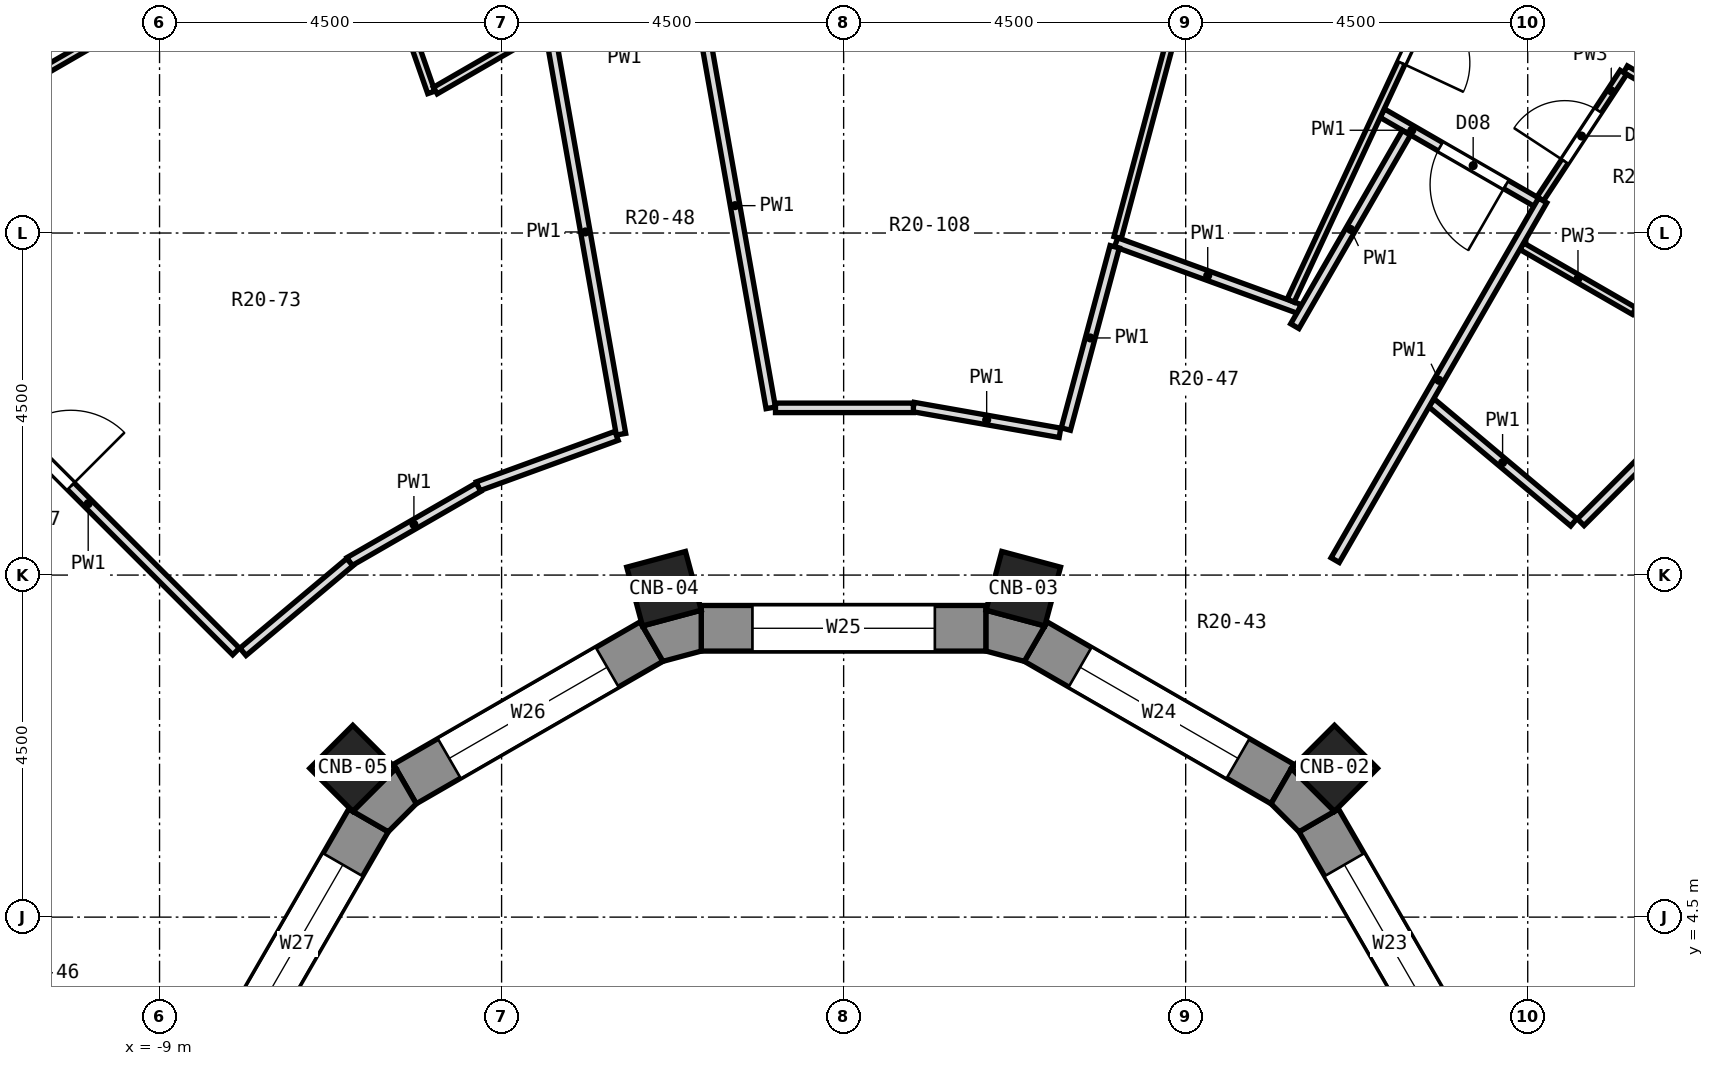
"""IFC4 building model, lengths in metres.
Left out: names, types, materials, properties, quantities, classifications, styles, units other than length and angle.
Written with IfcOpenShell. Run it as: python <this file> out.ifc"""

import sys

from ifc_helpers import new_model, si_unit, direction, frame, frame_2d, origin, origin_2d, place, context, subcontext, project, spatial, polyline, rectangle, outline, extrude, element, fill, save


model = new_model("IFC4")
c1 = context("Model", 3, precision=1e-05, world=origin(), true_north=direction((0.0, 1.0)))
c2 = subcontext(c1, "Body", "Model", "MODEL_VIEW")
j1 = project(units=[si_unit("LENGTHUNIT", "METRE"), si_unit("PLANEANGLEUNIT", "RADIAN")], contexts=[c1])
p1 = place(None, origin())
s1 = spatial("IfcSite", under=j1, at=p1, CompositionType="ELEMENT")
p2 = place(p1, origin())
s2 = spatial("IfcBuilding", under=s1, at=p2, CompositionType="ELEMENT")
p3 = place(p2, frame((0.0, 0.0, 121.6)))
s3 = spatial("IfcBuildingStorey", under=s2, at=p3, CompositionType="ELEMENT", Elevation=121.6)
for number, where, z_axis, x_axis in (
    (1, (6.458, 6.458, 0.0), (0.0, 0.0, 1.0), (0.707, 0.707, 0.0)),
    (2, (2.364, 8.821, 0.0), (0.0, 0.0, 1.0), (0.259, 0.966, 0.0)),
    (3, (-2.364, 8.821, 0.0), (0.0, 0.0, 1.0), (-0.259, 0.966, 0.0)),
    (4, (-6.458, 6.458, 0.0), (0.0, 0.0, 1.0), (-0.707, 0.707, 0.0)),
):
    element("IfcColumn", number, at=place(p3, frame(where, z_axis=z_axis, x_axis=x_axis)), inside=s3, PredefinedType="COLUMN", context=c2, shape_type="SweptSolid", body=[
        extrude(rectangle(XDim=0.8, YDim=0.8, at=origin_2d()), origin(), (0.0, 0.0, 1.0), 3.3),
    ])
p4 = place(p3, frame((8.125, 2.527, 0.0), z_axis=(0.0, 0.0, 1.0), x_axis=(-0.499964958637, 0.86604563398, 0.0)))
e5 = element("IfcWall", 5, at=p4, inside=s3, PredefinedType="SOLIDWALL", context=c2, shape_type="SweptSolid", body=[
    extrude(rectangle(XDim=3.747, YDim=0.6, at=frame_2d((1.874, 0.0))), origin(), (0.0, 0.0, 1.0), 2.8),
])
p5 = place(p4, frame((0.674, 0.0, 0.9)))
e6 = element("IfcOpeningElement", 6, at=p5, cuts=e5, PredefinedType="OPENING", context=c2, shape_type="SweptSolid", body=[
    extrude(rectangle(XDim=2.4, YDim=1.8, at=frame_2d((1.2, 0.9))), frame((0.0, 0.312, 0.0), z_axis=(0.0, -1.0, 0.0), x_axis=(1.0, 0.0, 0.0)), (0.0, 0.0, 1.0), 0.624),
])
p6 = place(p3, frame((5.773, 6.251, 0.0), z_axis=(0.0, 0.0, 1.0), x_axis=(-0.86604563398, 0.499964958637, 0.0)))
e7 = element("IfcWall", 7, at=p6, inside=s3, PredefinedType="SOLIDWALL", context=c2, shape_type="SweptSolid", body=[
    extrude(rectangle(XDim=3.747, YDim=0.6, at=frame_2d((1.874, 0.0))), origin(), (0.0, 0.0, 1.0), 2.8),
])
p7 = place(p6, frame((0.674, 0.0, 0.9)))
e8 = element("IfcOpeningElement", 8, at=p7, cuts=e7, PredefinedType="OPENING", context=c2, shape_type="SweptSolid", body=[
    extrude(rectangle(XDim=2.4, YDim=1.8, at=frame_2d((1.2, 0.9))), frame((0.0, 0.312, 0.0), z_axis=(0.0, -1.0, 0.0), x_axis=(1.0, 0.0, 0.0)), (0.0, 0.0, 1.0), 0.624),
])
p8 = place(p3, frame((1.874, 8.3, 0.0), z_axis=(0.0, 0.0, 1.0), x_axis=(-1.0, 0.0, 0.0)))
e9 = element("IfcWall", 9, at=p8, inside=s3, PredefinedType="SOLIDWALL", context=c2, shape_type="SweptSolid", body=[
    extrude(rectangle(XDim=3.748, YDim=0.6, at=frame_2d((1.874, 0.0))), origin(), (0.0, 0.0, 1.0), 2.8),
])
p9 = place(p8, frame((0.674, 0.0, 0.9)))
e10 = element("IfcOpeningElement", 10, at=p9, cuts=e9, PredefinedType="OPENING", context=c2, shape_type="SweptSolid", body=[
    extrude(rectangle(XDim=2.4, YDim=1.8, at=frame_2d((1.2, 0.9))), frame((0.0, 0.312, 0.0), z_axis=(0.0, -1.0, 0.0), x_axis=(1.0, 0.0, 0.0)), (0.0, 0.0, 1.0), 0.624),
])
p10 = place(p3, frame((-2.527, 8.125, 0.0), z_axis=(0.0, 0.0, 1.0), x_axis=(-0.86604563398, -0.499964958637, 0.0)))
e11 = element("IfcWall", 11, at=p10, inside=s3, PredefinedType="SOLIDWALL", context=c2, shape_type="SweptSolid", body=[
    extrude(rectangle(XDim=3.747, YDim=0.6, at=frame_2d((1.874, 0.0))), origin(), (0.0, 0.0, 1.0), 2.8),
])
p11 = place(p10, frame((0.674, 0.0, 0.9)))
e12 = element("IfcOpeningElement", 12, at=p11, cuts=e11, PredefinedType="OPENING", context=c2, shape_type="SweptSolid", body=[
    extrude(rectangle(XDim=2.4, YDim=1.8, at=frame_2d((1.2, 0.9))), frame((0.0, 0.312, 0.0), z_axis=(0.0, -1.0, 0.0), x_axis=(1.0, 0.0, 0.0)), (0.0, 0.0, 1.0), 0.624),
])
p12 = place(p3, frame((-6.251, 5.773, 0.0), z_axis=(0.0, 0.0, 1.0), x_axis=(-0.499964958637, -0.86604563398, 0.0)))
e13 = element("IfcWall", 13, at=p12, inside=s3, PredefinedType="SOLIDWALL", context=c2, shape_type="SweptSolid", body=[
    extrude(rectangle(XDim=3.747, YDim=0.6, at=frame_2d((1.874, 0.0))), origin(), (0.0, 0.0, 1.0), 2.8),
])
p13 = place(p12, frame((0.674, 0.0, 0.9)))
e14 = element("IfcOpeningElement", 14, at=p13, cuts=e13, PredefinedType="OPENING", context=c2, shape_type="SweptSolid", body=[
    extrude(rectangle(XDim=2.4, YDim=1.8, at=frame_2d((1.2, 0.9))), frame((0.0, 0.312, 0.0), z_axis=(0.0, -1.0, 0.0), x_axis=(1.0, 0.0, 0.0)), (0.0, 0.0, 1.0), 0.624),
])
p14 = place(p3, origin())
e15 = element("IfcWall", 15, at=p14, inside=s3, PredefinedType="SOLIDWALL", context=c2, shape_type="SweptSolid", body=[
    extrude(outline(polyline([(5.892, 6.458), (5.623, 5.991), (5.991, 5.623), (6.458, 5.892), (5.892, 6.458)])), origin(), (0.0, 0.0, 1.0), 2.8),
])
p15 = place(p3, origin())
e16 = element("IfcWall", 16, at=p15, inside=s3, PredefinedType="SOLIDWALL", context=c2, shape_type="SweptSolid", body=[
    extrude(outline(polyline([(1.874, 8.538), (1.874, 8.0), (2.377, 7.865), (2.646, 8.331), (1.874, 8.538)])), origin(), (0.0, 0.0, 1.0), 2.8),
])
p16 = place(p3, origin())
e17 = element("IfcWall", 17, at=p16, inside=s3, PredefinedType="SOLIDWALL", context=c2, shape_type="SweptSolid", body=[
    extrude(outline(polyline([(-2.646, 8.331), (-2.377, 7.865), (-1.874, 8.0), (-1.874, 8.538), (-2.646, 8.331)])), origin(), (0.0, 0.0, 1.0), 2.8),
])
p17 = place(p3, origin())
e18 = element("IfcWall", 18, at=p17, inside=s3, PredefinedType="SOLIDWALL", context=c2, shape_type="SweptSolid", body=[
    extrude(outline(polyline([(-6.458, 5.892), (-5.991, 5.623), (-5.623, 5.991), (-5.892, 6.458), (-6.458, 5.892)])), origin(), (0.0, 0.0, 1.0), 2.8),
])
p18 = place(p3, frame((-3.867, 16.174, 0.0), z_axis=(0.0, 0.0, 1.0), x_axis=(0.173602314867, -0.98481583876, 0.0)))
e19 = element("IfcWall", 19, at=p18, inside=s3, PredefinedType="PARTITIONING", context=c2, shape_type="SweptSolid", body=[
    extrude(rectangle(XDim=5.403, YDim=0.125, at=frame_2d((2.702, 0.0))), origin(), (0.0, 0.0, 1.0), 2.8),
])
p19 = place(p3, frame((-1.898, 16.521, 0.0), z_axis=(0.0, 0.0, 1.0), x_axis=(0.173777601074, -0.984784923405, 0.0)))
e20 = element("IfcWall", 20, at=p19, inside=s3, PredefinedType="PARTITIONING", context=c2, shape_type="SweptSolid", body=[
    extrude(rectangle(XDim=5.403, YDim=0.125, at=frame_2d((2.702, 0.0))), origin(), (0.0, 0.0, 1.0), 2.8),
])
p20 = place(p3, frame((-6.292, 17.835, 0.0), z_axis=(0.0, 0.0, 1.0), x_axis=(0.329581778564, -0.944127031304, 0.0)))
e21 = element("IfcWall", 21, at=p20, inside=s3, PredefinedType="PARTITIONING", context=c2, shape_type="SweptSolid", body=[
    extrude(rectangle(XDim=2.632, YDim=0.1, at=frame_2d((1.316, 0.0))), origin(), (0.0, 0.0, 1.0), 2.8),
])
p21 = place(p20, frame((0.916, 0.0, 0.0)))
e22 = element("IfcOpeningElement", 22, at=p21, cuts=e21, PredefinedType="OPENING", context=c2, shape_type="SweptSolid", body=[
    extrude(rectangle(XDim=0.8, YDim=2.1, at=frame_2d((0.4, 1.05))), frame((0.0, 0.062, 0.0), z_axis=(0.0, -1.0, 0.0), x_axis=(1.0, 0.0, 0.0)), (0.0, 0.0, 1.0), 0.124),
])
p22 = place(p3, frame((-13.086, 13.086, 0.0), z_axis=(0.0, 0.0, 1.0), x_axis=(0.707208486583, -0.707005061159, 0.0)))
e23 = element("IfcWall", 23, at=p22, inside=s3, PredefinedType="PARTITIONING", context=c2, shape_type="SweptSolid", body=[
    extrude(rectangle(XDim=7.201, YDim=0.125, at=frame_2d((3.601, 0.0))), origin(), (0.0, 0.0, 1.0), 2.8),
])
p23 = place(p22, frame((3.126, 0.0, 0.0)))
e24 = element("IfcOpeningElement", 24, at=p23, cuts=e23, PredefinedType="OPENING", context=c2, shape_type="SweptSolid", body=[
    extrude(rectangle(XDim=1.0, YDim=2.1, at=frame_2d((0.5, 1.05))), frame((0.0, 0.074, 0.0), z_axis=(0.0, -1.0, 0.0), x_axis=(1.0, 0.0, 0.0)), (0.0, 0.0, 1.0), 0.149),
])
p24 = place(p3, frame((7.733, 11.267, 0.0), z_axis=(0.0, 0.0, 1.0), x_axis=(0.765785489597, -0.643096092293, 0.0)))
e25 = element("IfcWall", 25, at=p24, inside=s3, PredefinedType="PARTITIONING", context=c2, shape_type="SweptSolid", body=[
    extrude(rectangle(XDim=2.446, YDim=0.125, at=frame_2d((1.223, 0.0))), origin(), (0.0, 0.0, 1.0), 2.8),
])
p25 = place(p3, frame((8.921, 13.327, 0.0), z_axis=(0.0, 0.0, 1.0), x_axis=(0.866168931404, -0.499751320429, 0.0)))
e26 = element("IfcWall", 26, at=p25, inside=s3, PredefinedType="PARTITIONING", context=c2, shape_type="SweptSolid", body=[
    extrude(rectangle(XDim=1.708, YDim=0.1, at=frame_2d((0.854, 0.0))), origin(), (0.0, 0.0, 1.0), 2.8),
])
p26 = place(p3, frame((7.086, 15.077, 0.0), z_axis=(0.0, 0.0, 1.0), x_axis=(0.866192474201, -0.499710513836, 0.0)))
e27 = element("IfcWall", 27, at=p26, inside=s3, PredefinedType="PARTITIONING", context=c2, shape_type="SweptSolid", body=[
    extrude(rectangle(XDim=2.36, YDim=0.125, at=frame_2d((1.18, 0.0))), origin(), (0.0, 0.0, 1.0), 2.8),
])
p27 = place(p26, frame((0.881, 0.0, 0.0)))
e28 = element("IfcOpeningElement", 28, at=p27, cuts=e27, PredefinedType="OPENING", context=c2, shape_type="SweptSolid", body=[
    extrude(rectangle(XDim=1.0, YDim=2.1, at=frame_2d((0.5, 1.05))), frame((0.0, 0.074, 0.0), z_axis=(0.0, -1.0, 0.0), x_axis=(1.0, 0.0, 0.0)), (0.0, 0.0, 1.0), 0.149),
])
p28 = place(p3, frame((10.286, 15.655, 0.0), z_axis=(0.0, 0.0, 1.0), x_axis=(0.865980246016, -0.500078207394, 0.0)))
e29 = element("IfcWall", 29, at=p28, inside=s3, PredefinedType="PARTITIONING", context=c2, shape_type="SweptSolid", body=[
    extrude(rectangle(XDim=2.02, YDim=0.1, at=frame_2d((1.01, 0.0))), origin(), (0.0, 0.0, 1.0), 2.8),
])
p29 = place(p3, frame((3.585, 13.379, 0.0), z_axis=(0.0, 0.0, 1.0), x_axis=(0.939651552045, -0.342132957691, 0.0)))
e30 = element("IfcWall", 30, at=p29, inside=s3, PredefinedType="PARTITIONING", context=c2, shape_type="SweptSolid", body=[
    extrude(rectangle(XDim=2.564, YDim=0.125, at=frame_2d((1.282, 0.0))), origin(), (0.0, 0.0, 1.0), 2.8),
])
p30 = place(p3, frame((0.917, 11.211, 0.0), z_axis=(0.0, 0.0, 1.0), x_axis=(0.984842502131, -0.173450990183, 0.0)))
e31 = element("IfcWall", 31, at=p30, inside=s3, PredefinedType="PARTITIONING", context=c2, shape_type="SweptSolid", body=[
    extrude(rectangle(XDim=1.958, YDim=0.125, at=frame_2d((0.979, 0.0))), origin(), (0.0, 0.0, 1.0), 2.8),
])
p31 = place(p3, frame((-0.896, 11.2, 0.0), z_axis=(0.0, 0.0, 1.0), x_axis=(1.0, 0.0, 0.0)))
e32 = element("IfcWall", 32, at=p31, inside=s3, PredefinedType="PARTITIONING", context=c2, shape_type="SweptSolid", body=[
    extrude(rectangle(XDim=1.814, YDim=0.125, at=frame_2d((0.907, 0.0))), origin(), (0.0, 0.0, 1.0), 2.8),
])
p32 = place(p3, frame((-4.811, 10.167, 0.0), z_axis=(0.0, 0.0, 1.0), x_axis=(0.939506513074, 0.34253103785, 0.0)))
e33 = element("IfcWall", 33, at=p32, inside=s3, PredefinedType="PARTITIONING", context=c2, shape_type="SweptSolid", body=[
    extrude(rectangle(XDim=1.94, YDim=0.125, at=frame_2d((0.97, 0.0))), origin(), (0.0, 0.0, 1.0), 2.8),
])
p33 = place(p3, frame((-6.502, 9.177, 0.0), z_axis=(0.0, 0.0, 1.0), x_axis=(0.866328596722, 0.499474486338, 0.0)))
e34 = element("IfcWall", 34, at=p33, inside=s3, PredefinedType="PARTITIONING", context=c2, shape_type="SweptSolid", body=[
    extrude(rectangle(XDim=1.96, YDim=0.125, at=frame_2d((0.98, 0.0))), origin(), (0.0, 0.0, 1.0), 2.8),
])
p34 = place(p3, frame((-5.372, 15.374, 0.0), z_axis=(0.0, 0.0, 1.0), x_axis=(0.866111216017, 0.499851339389, 0.0)))
e35 = element("IfcWall", 35, at=p34, inside=s3, PredefinedType="PARTITIONING", context=c2, shape_type="SweptSolid", body=[
    extrude(rectangle(XDim=1.202, YDim=0.1, at=frame_2d((0.601, 0.0))), origin(), (0.0, 0.0, 1.0), 2.8),
])
p35 = place(p3, frame((-10.868, 15.433, 0.0), z_axis=(0.0, 0.0, 1.0), x_axis=(0.866020017222, 0.500009329683, 0.0)))
e36 = element("IfcWall", 36, at=p35, inside=s3, PredefinedType="PARTITIONING", context=c2, shape_type="SweptSolid", body=[
    extrude(rectangle(XDim=3.291, YDim=0.1, at=frame_2d((1.645, 0.0))), origin(), (0.0, 0.0, 1.0), 2.8),
])
p36 = place(p3, frame((-7.902, 7.99, 0.0), z_axis=(0.0, 0.0, 1.0), x_axis=(0.765904046375, 0.642954890911, 0.0)))
e37 = element("IfcWall", 37, at=p36, inside=s3, PredefinedType="PARTITIONING", context=c2, shape_type="SweptSolid", body=[
    extrude(rectangle(XDim=1.835, YDim=0.125, at=frame_2d((0.917, 0.0))), origin(), (0.0, 0.0, 1.0), 2.8),
])
p37 = place(p3, frame((9.697, 9.695, 0.0), z_axis=(0.0, 0.0, 1.0), x_axis=(0.707106781187, 0.707106781187, 0.0)))
e38 = element("IfcWall", 38, at=p37, inside=s3, PredefinedType="PARTITIONING", context=c2, shape_type="SweptSolid", body=[
    extrude(rectangle(XDim=4.784, YDim=0.125, at=frame_2d((2.392, 0.0))), origin(), (0.0, 0.0, 1.0), 2.8),
])
p38 = place(p3, frame((9.165, 13.95, 0.0), z_axis=(0.0, 0.0, 1.0), x_axis=(0.549454342873, 0.835523742989, 0.0)))
e39 = element("IfcWall", 39, at=p38, inside=s3, PredefinedType="PARTITIONING", context=c2, shape_type="SweptSolid", body=[
    extrude(rectangle(XDim=1.991, YDim=0.1, at=frame_2d((0.996, 0.0))), origin(), (0.0, 0.0, 1.0), 2.8),
])
p39 = place(p38, frame((0.589, 0.0, 0.0)))
e40 = element("IfcOpeningElement", 40, at=p39, cuts=e39, PredefinedType="OPENING", context=c2, shape_type="SweptSolid", body=[
    extrude(rectangle(XDim=0.8, YDim=2.1, at=frame_2d((0.4, 1.05))), frame((0.0, 0.062, 0.0), z_axis=(0.0, -1.0, 0.0), x_axis=(1.0, 0.0, 0.0)), (0.0, 0.0, 1.0), 0.124),
])
p40 = place(p3, frame((6.467, 9.197, 0.0), z_axis=(0.0, 0.0, 1.0), x_axis=(0.499744377638, 0.866172937132, 0.0)))
e41 = element("IfcWall", 41, at=p40, inside=s3, PredefinedType="PARTITIONING", context=c2, shape_type="SweptSolid", body=[
    extrude(rectangle(XDim=5.463, YDim=0.125, at=frame_2d((2.731, 0.0))), origin(), (0.0, 0.0, 1.0), 2.8),
])
p41 = place(p3, frame((5.936, 12.275, 0.0), z_axis=(0.0, 0.0, 1.0), x_axis=(0.499715257766, 0.866189737388, 0.0)))
e42 = element("IfcWall", 42, at=p41, inside=s3, PredefinedType="PARTITIONING", context=c2, shape_type="SweptSolid", body=[
    extrude(rectangle(XDim=2.937, YDim=0.125, at=frame_2d((1.469, 0.0))), origin(), (0.0, 0.0, 1.0), 2.8),
])
p42 = place(p3, frame((5.881, 12.611, 0.0), z_axis=(0.0, 0.0, 1.0), x_axis=(0.422604500324, 0.906314203964, 0.0)))
e43 = element("IfcWall", 43, at=p42, inside=s3, PredefinedType="PARTITIONING", context=c2, shape_type="SweptSolid", body=[
    extrude(rectangle(XDim=11.75, YDim=0.1, at=frame_2d((5.875, 0.0))), origin(), (0.0, 0.0, 1.0), 2.8),
])
p43 = place(p42, frame((3.45, 0.0, 0.0)))
e44 = element("IfcOpeningElement", 44, at=p43, cuts=e43, PredefinedType="OPENING", context=c2, shape_type="SweptSolid", body=[
    extrude(rectangle(XDim=0.9, YDim=2.1, at=frame_2d((0.45, 1.05))), frame((0.0, 0.062, 0.0), z_axis=(0.0, -1.0, 0.0), x_axis=(1.0, 0.0, 0.0)), (0.0, 0.0, 1.0), 0.124),
])
p44 = place(p3, frame((3.605, 13.44, 0.0), z_axis=(0.0, 0.0, 1.0), x_axis=(0.258538057112, 0.966001072994, 0.0)))
e45 = element("IfcWall", 45, at=p44, inside=s3, PredefinedType="PARTITIONING", context=c2, shape_type="SweptSolid", body=[
    extrude(rectangle(XDim=11.75, YDim=0.1, at=frame_2d((5.875, 0.0))), origin(), (0.0, 0.0, 1.0), 2.8),
])
p45 = place(p44, frame((3.45, 0.0, 0.0)))
e46 = element("IfcOpeningElement", 46, at=p45, cuts=e45, PredefinedType="OPENING", context=c2, shape_type="SweptSolid", body=[
    extrude(rectangle(XDim=0.9, YDim=2.1, at=frame_2d((0.45, 1.05))), frame((0.0, 0.062, 0.0), z_axis=(0.0, -1.0, 0.0), x_axis=(1.0, 0.0, 0.0)), (0.0, 0.0, 1.0), 0.124),
])
p46 = place(p3, frame((2.923, 10.921, 0.0), z_axis=(0.0, 0.0, 1.0), x_axis=(0.258837674225, 0.965920834438, 0.0)))
e47 = element("IfcWall", 47, at=p46, inside=s3, PredefinedType="PARTITIONING", context=c2, shape_type="SweptSolid", body=[
    extrude(rectangle(XDim=2.483, YDim=0.125, at=frame_2d((1.241, 0.0))), origin(), (0.0, 0.0, 1.0), 2.8),
])
p47 = place(p5, origin())
e48 = element("IfcWindow", 48, at=p47, inside=s3, PartitioningType="SINGLE_PANEL", PredefinedType="WINDOW", context=c2, shape_type="SweptSolid", body=[
    extrude(rectangle(XDim=2.4, YDim=1.8, at=frame_2d((1.2, 0.9))), frame((0.0, -0.12, 0.0), z_axis=(0.0, -1.0, 0.0), x_axis=(1.0, 0.0, 0.0)), (0.0, 0.0, 1.0), 0.06),
])
fill(e6, e48)
p48 = place(p7, origin())
e49 = element("IfcWindow", 49, at=p48, inside=s3, PartitioningType="SINGLE_PANEL", PredefinedType="WINDOW", context=c2, shape_type="SweptSolid", body=[
    extrude(rectangle(XDim=2.4, YDim=1.8, at=frame_2d((1.2, 0.9))), frame((0.0, -0.12, 0.0), z_axis=(0.0, -1.0, 0.0), x_axis=(1.0, 0.0, 0.0)), (0.0, 0.0, 1.0), 0.06),
])
fill(e8, e49)
p49 = place(p9, origin())
e50 = element("IfcWindow", 50, at=p49, inside=s3, PartitioningType="SINGLE_PANEL", PredefinedType="WINDOW", context=c2, shape_type="SweptSolid", body=[
    extrude(rectangle(XDim=2.4, YDim=1.8, at=frame_2d((1.2, 0.9))), frame((0.0, -0.12, 0.0), z_axis=(0.0, -1.0, 0.0), x_axis=(1.0, 0.0, 0.0)), (0.0, 0.0, 1.0), 0.06),
])
fill(e10, e50)
p50 = place(p11, origin())
e51 = element("IfcWindow", 51, at=p50, inside=s3, PartitioningType="SINGLE_PANEL", PredefinedType="WINDOW", context=c2, shape_type="SweptSolid", body=[
    extrude(rectangle(XDim=2.4, YDim=1.8, at=frame_2d((1.2, 0.9))), frame((0.0, -0.12, 0.0), z_axis=(0.0, -1.0, 0.0), x_axis=(1.0, 0.0, 0.0)), (0.0, 0.0, 1.0), 0.06),
])
fill(e12, e51)
p51 = place(p13, origin())
e52 = element("IfcWindow", 52, at=p51, inside=s3, PartitioningType="SINGLE_PANEL", PredefinedType="WINDOW", context=c2, shape_type="SweptSolid", body=[
    extrude(rectangle(XDim=2.4, YDim=1.8, at=frame_2d((1.2, 0.9))), frame((0.0, -0.12, 0.0), z_axis=(0.0, -1.0, 0.0), x_axis=(1.0, 0.0, 0.0)), (0.0, 0.0, 1.0), 0.06),
])
fill(e14, e52)
p52 = place(p39, origin())
e53 = element("IfcDoor", 53, at=p52, inside=s3, OperationType="SINGLE_SWING_LEFT", PredefinedType="DOOR", context=c2, shape_type="SweptSolid", body=[
    extrude(rectangle(XDim=0.8, YDim=2.1, at=frame_2d((0.4, 1.05))), frame((0.0, 0.025, 0.0), z_axis=(0.0, -1.0, 0.0), x_axis=(1.0, 0.0, 0.0)), (0.0, 0.0, 1.0), 0.05),
])
fill(e40, e53)
p53 = place(p27, frame((1.0, 0.0, 0.0), z_axis=(0.0, 0.0, 1.0), x_axis=(-1.0, 0.0, 0.0)))
e54 = element("IfcDoor", 54, at=p53, inside=s3, OperationType="SINGLE_SWING_LEFT", PredefinedType="DOOR", context=c2, shape_type="SweptSolid", body=[
    extrude(rectangle(XDim=1.0, YDim=2.1, at=frame_2d((0.5, 1.05))), frame((0.0, 0.025, 0.0), z_axis=(0.0, -1.0, 0.0), x_axis=(1.0, 0.0, 0.0)), (0.0, 0.0, 1.0), 0.05),
])
fill(e28, e54)
p54 = place(p43, frame((0.9, 0.0, 0.0), z_axis=(0.0, 0.0, 1.0), x_axis=(-1.0, 0.0, 0.0)))
e55 = element("IfcDoor", 55, at=p54, inside=s3, OperationType="SINGLE_SWING_RIGHT", PredefinedType="DOOR", context=c2, shape_type="SweptSolid", body=[
    extrude(rectangle(XDim=0.9, YDim=2.1, at=frame_2d((0.45, 1.05))), frame((0.0, 0.025, 0.0), z_axis=(0.0, -1.0, 0.0), x_axis=(1.0, 0.0, 0.0)), (0.0, 0.0, 1.0), 0.05),
])
fill(e44, e55)
p55 = place(p23, origin())
e56 = element("IfcDoor", 56, at=p55, inside=s3, OperationType="SINGLE_SWING_RIGHT", PredefinedType="DOOR", context=c2, shape_type="SweptSolid", body=[
    extrude(rectangle(XDim=1.0, YDim=2.1, at=frame_2d((0.5, 1.05))), frame((0.0, 0.025, 0.0), z_axis=(0.0, -1.0, 0.0), x_axis=(1.0, 0.0, 0.0)), (0.0, 0.0, 1.0), 0.05),
])
fill(e24, e56)
save(model, sys.argv[1])
